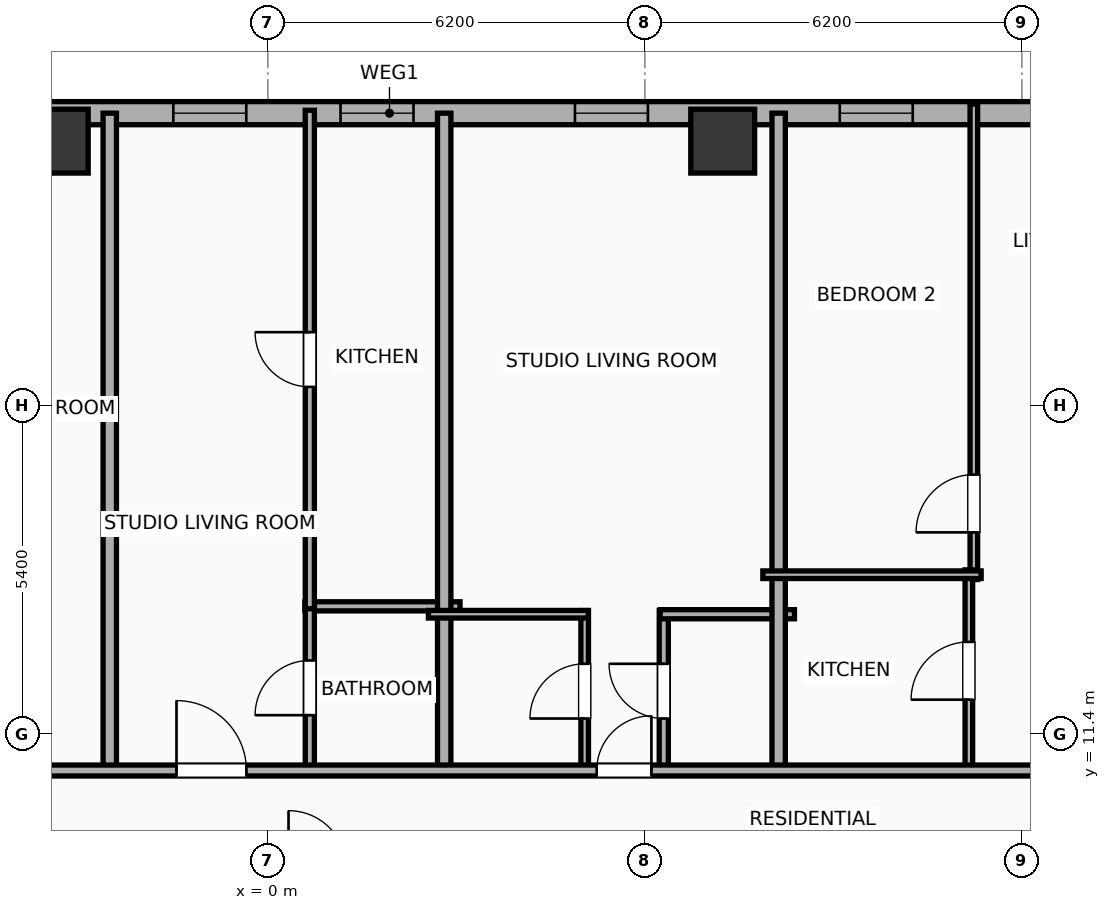
"""IFC4 building model, lengths in metres.
Left out: names, types, materials, properties, quantities, classifications, styles, units other than length and angle.
Written with IfcOpenShell. Run it as: python <this file> out.ifc"""

import sys

from ifc_helpers import new_model, si_unit, direction, frame, frame_2d, origin, origin_2d, place, context, subcontext, project, spatial, rectangle, hollow_rectangle, extrude, element, fill, save


model = new_model("IFC4")
c1 = context("Model", 3, precision=1e-05, world=origin(), true_north=direction((0.0, 1.0)))
c2 = subcontext(c1, "Body", "Model", "MODEL_VIEW")
j1 = project(units=[si_unit("LENGTHUNIT", "METRE"), si_unit("PLANEANGLEUNIT", "RADIAN")], contexts=[c1])
p1 = place(None, origin())
s1 = spatial("IfcSite", under=j1, at=p1, CompositionType="ELEMENT")
p2 = place(p1, origin())
s2 = spatial("IfcBuilding", under=s1, at=p2, CompositionType="ELEMENT")
p3 = place(p2, frame((0.0, 0.0, 132.6)))
s3 = spatial("IfcBuildingStorey", under=s2, at=p3, CompositionType="ELEMENT", Elevation=132.6)
for number, where, z_axis, x_axis in (
    (1, (7.48, 21.15, 0.0), (0.0, 0.0, 1.0), (1.0, 0.0, 0.0)),
    (2, (-3.48, 21.15, 0.0), (0.0, 0.0, 1.0), (1.0, 0.0, 0.0)),
):
    element("IfcColumn", number, at=place(p3, frame(where, z_axis=z_axis, x_axis=x_axis)), inside=s3, PredefinedType="COLUMN", context=c2, shape_type="SweptSolid", body=[
        extrude(hollow_rectangle(XDim=1.05, YDim=1.05, WallThickness=0.036, at=origin_2d()), origin(), (0.0, 0.0, 1.0), 3.9),
    ])
p4 = place(p3, frame((-25.381, 21.61, 0.0), z_axis=(0.0, 0.0, 1.0), x_axis=(1.0, 0.0, 0.0)))
e3 = element("IfcWall", 3, at=p4, inside=s3, PredefinedType="ELEMENTEDWALL", context=c2, shape_type="SweptSolid", body=[
    extrude(rectangle(XDim=54.763, YDim=0.38, at=frame_2d((27.381, 0.0))), origin(), (0.0, 0.0, 1.0), 3.65),
])
p5 = place(p4, frame((5.645, 0.0, 0.75)))
e4 = element("IfcOpeningElement", 4, at=p5, cuts=e3, PredefinedType="OPENING", context=c2, shape_type="SweptSolid", body=[
    extrude(rectangle(XDim=2.4, YDim=2.1, at=frame_2d((1.2, 1.05))), frame((0.0, 0.2, 0.0), z_axis=(0.0, -1.0, 0.0), x_axis=(1.0, 0.0, 0.0)), (0.0, 0.0, 1.0), 0.4),
])
p6 = place(p4, frame((45.067, 0.0, 0.75)))
e5 = element("IfcOpeningElement", 5, at=p6, cuts=e3, PredefinedType="OPENING", context=c2, shape_type="SweptSolid", body=[
    extrude(rectangle(XDim=2.4, YDim=2.1, at=frame_2d((1.2, 1.05))), frame((0.0, 0.2, 0.0), z_axis=(0.0, -1.0, 0.0), x_axis=(1.0, 0.0, 0.0)), (0.0, 0.0, 1.0), 0.4),
])
p7 = place(p4, frame((1.831, 0.0, 0.75)))
e6 = element("IfcOpeningElement", 6, at=p7, cuts=e3, PredefinedType="OPENING", context=c2, shape_type="SweptSolid", body=[
    extrude(rectangle(XDim=1.2, YDim=2.05, at=frame_2d((0.6, 1.025))), frame((0.0, 0.2, 0.0), z_axis=(0.0, -1.0, 0.0), x_axis=(1.0, 0.0, 0.0)), (0.0, 0.0, 1.0), 0.4),
])
p8 = place(p4, frame((8.996, 0.0, 0.75)))
e7 = element("IfcOpeningElement", 7, at=p8, cuts=e3, PredefinedType="OPENING", context=c2, shape_type="SweptSolid", body=[
    extrude(rectangle(XDim=1.2, YDim=2.05, at=frame_2d((0.6, 1.025))), frame((0.0, 0.2, 0.0), z_axis=(0.0, -1.0, 0.0), x_axis=(1.0, 0.0, 0.0)), (0.0, 0.0, 1.0), 0.4),
])
p9 = place(p4, frame((15.102, 0.0, 0.75)))
e8 = element("IfcOpeningElement", 8, at=p9, cuts=e3, PredefinedType="OPENING", context=c2, shape_type="SweptSolid", body=[
    extrude(rectangle(XDim=1.2, YDim=2.05, at=frame_2d((0.6, 1.025))), frame((0.0, 0.2, 0.0), z_axis=(0.0, -1.0, 0.0), x_axis=(1.0, 0.0, 0.0)), (0.0, 0.0, 1.0), 0.4),
])
p10 = place(p4, frame((12.352, 0.0, 0.75)))
e9 = element("IfcOpeningElement", 9, at=p10, cuts=e3, PredefinedType="OPENING", context=c2, shape_type="SweptSolid", body=[
    extrude(rectangle(XDim=1.2, YDim=2.05, at=frame_2d((0.6, 1.025))), frame((0.0, 0.2, 0.0), z_axis=(0.0, -1.0, 0.0), x_axis=(1.0, 0.0, 0.0)), (0.0, 0.0, 1.0), 0.4),
])
p11 = place(p4, frame((19.936, 0.0, 0.75)))
e10 = element("IfcOpeningElement", 10, at=p11, cuts=e3, PredefinedType="OPENING", context=c2, shape_type="SweptSolid", body=[
    extrude(rectangle(XDim=1.2, YDim=2.05, at=frame_2d((0.6, 1.025))), frame((0.0, 0.2, 0.0), z_axis=(0.0, -1.0, 0.0), x_axis=(1.0, 0.0, 0.0)), (0.0, 0.0, 1.0), 0.4),
])
p12 = place(p4, frame((17.786, 0.0, 0.75)))
e11 = element("IfcOpeningElement", 11, at=p12, cuts=e3, PredefinedType="OPENING", context=c2, shape_type="SweptSolid", body=[
    extrude(rectangle(XDim=1.2, YDim=2.05, at=frame_2d((0.6, 1.025))), frame((0.0, 0.2, 0.0), z_axis=(0.0, -1.0, 0.0), x_axis=(1.0, 0.0, 0.0)), (0.0, 0.0, 1.0), 0.4),
])
p13 = place(p4, frame((23.826, 0.0, 0.75)))
e12 = element("IfcOpeningElement", 12, at=p13, cuts=e3, PredefinedType="OPENING", context=c2, shape_type="SweptSolid", body=[
    extrude(rectangle(XDim=1.2, YDim=2.05, at=frame_2d((0.6, 1.025))), frame((0.0, 0.2, 0.0), z_axis=(0.0, -1.0, 0.0), x_axis=(1.0, 0.0, 0.0)), (0.0, 0.0, 1.0), 0.4),
])
p14 = place(p4, frame((26.576, 0.0, 0.75)))
e13 = element("IfcOpeningElement", 13, at=p14, cuts=e3, PredefinedType="OPENING", context=c2, shape_type="SweptSolid", body=[
    extrude(rectangle(XDim=1.2, YDim=2.05, at=frame_2d((0.6, 1.025))), frame((0.0, 0.2, 0.0), z_axis=(0.0, -1.0, 0.0), x_axis=(1.0, 0.0, 0.0)), (0.0, 0.0, 1.0), 0.4),
])
p15 = place(p4, frame((30.431, 0.0, 0.75)))
e14 = element("IfcOpeningElement", 14, at=p15, cuts=e3, PredefinedType="OPENING", context=c2, shape_type="SweptSolid", body=[
    extrude(rectangle(XDim=1.2, YDim=2.05, at=frame_2d((0.6, 1.025))), frame((0.0, 0.2, 0.0), z_axis=(0.0, -1.0, 0.0), x_axis=(1.0, 0.0, 0.0)), (0.0, 0.0, 1.0), 0.4),
])
p16 = place(p4, frame((38.581, 0.0, 0.75)))
e15 = element("IfcOpeningElement", 15, at=p16, cuts=e3, PredefinedType="OPENING", context=c2, shape_type="SweptSolid", body=[
    extrude(rectangle(XDim=1.2, YDim=2.05, at=frame_2d((0.6, 1.025))), frame((0.0, 0.2, 0.0), z_axis=(0.0, -1.0, 0.0), x_axis=(1.0, 0.0, 0.0)), (0.0, 0.0, 1.0), 0.4),
])
p17 = place(p4, frame((34.786, 0.0, 0.75)))
e16 = element("IfcOpeningElement", 16, at=p17, cuts=e3, PredefinedType="OPENING", context=c2, shape_type="SweptSolid", body=[
    extrude(rectangle(XDim=1.2, YDim=2.05, at=frame_2d((0.6, 1.025))), frame((0.0, 0.2, 0.0), z_axis=(0.0, -1.0, 0.0), x_axis=(1.0, 0.0, 0.0)), (0.0, 0.0, 1.0), 0.4),
])
p18 = place(p4, frame((41.876, 0.0, 0.75)))
e17 = element("IfcOpeningElement", 17, at=p18, cuts=e3, PredefinedType="OPENING", context=c2, shape_type="SweptSolid", body=[
    extrude(rectangle(XDim=1.2, YDim=2.05, at=frame_2d((0.6, 1.025))), frame((0.0, 0.2, 0.0), z_axis=(0.0, -1.0, 0.0), x_axis=(1.0, 0.0, 0.0)), (0.0, 0.0, 1.0), 0.4),
])
p19 = place(p4, frame((49.385, 0.0, 0.75)))
e18 = element("IfcOpeningElement", 18, at=p19, cuts=e3, PredefinedType="OPENING", context=c2, shape_type="SweptSolid", body=[
    extrude(rectangle(XDim=1.2, YDim=2.05, at=frame_2d((0.6, 1.025))), frame((0.0, 0.2, 0.0), z_axis=(0.0, -1.0, 0.0), x_axis=(1.0, 0.0, 0.0)), (0.0, 0.0, 1.0), 0.4),
])
p20 = place(p4, frame((52.181, 0.0, 0.75)))
e19 = element("IfcOpeningElement", 19, at=p20, cuts=e3, PredefinedType="OPENING", context=c2, shape_type="SweptSolid", body=[
    extrude(rectangle(XDim=1.2, YDim=2.05, at=frame_2d((0.6, 1.025))), frame((0.0, 0.2, 0.0), z_axis=(0.0, -1.0, 0.0), x_axis=(1.0, 0.0, 0.0)), (0.0, 0.0, 1.0), 0.4),
])
p21 = place(p3, frame((-2.6, 10.72, 0.0), z_axis=(0.0, 0.0, 1.0), x_axis=(0.0, 1.0, 0.0)))
e20 = element("IfcWall", 20, at=p21, inside=s3, PredefinedType="PARTITIONING", context=c2, shape_type="SweptSolid", body=[
    extrude(rectangle(XDim=10.89, YDim=0.22, at=frame_2d((5.445, 0.0))), origin(), (0.0, 0.0, 1.0), 3.65),
])
p22 = place(p3, frame((0.61, 13.5, 0.0), z_axis=(0.0, 0.0, 1.0), x_axis=(1.0, 0.0, 0.0)))
e21 = element("IfcWall", 21, at=p22, inside=s3, PredefinedType="PLUMBINGWALL", context=c2, shape_type="SweptSolid", body=[
    extrude(rectangle(XDim=2.55, YDim=0.15, at=frame_2d((1.275, 0.0))), origin(), (0.0, 0.0, 1.0), 3.65),
])
p23 = place(p3, frame((0.69, 10.78, 0.0), z_axis=(0.0, 0.0, 1.0), x_axis=(0.0, 1.0, 0.0)))
e22 = element("IfcWall", 22, at=p23, inside=s3, PredefinedType="PLUMBINGWALL", context=c2, shape_type="SweptSolid", body=[
    extrude(rectangle(XDim=2.76, YDim=0.15, at=frame_2d((1.38, 0.0))), origin(), (0.0, 0.0, 1.0), 3.65),
])
p24 = place(p23, frame((0.93, 0.0, 0.0)))
e23 = element("IfcOpeningElement", 23, at=p24, cuts=e22, PredefinedType="OPENING", context=c2, shape_type="SweptSolid", body=[
    extrude(rectangle(XDim=0.9, YDim=2.05, at=frame_2d((0.45, 1.025))), frame((0.0, 0.085, 0.0), z_axis=(0.0, -1.0, 0.0), x_axis=(1.0, 0.0, 0.0)), (0.0, 0.0, 1.0), 0.17),
])
p25 = place(p3, frame((0.69, 13.46, 0.0), z_axis=(0.0, 0.0, 1.0), x_axis=(0.0, 1.0, 0.0)))
e24 = element("IfcWall", 24, at=p25, inside=s3, PredefinedType="PLUMBINGWALL", context=c2, shape_type="SweptSolid", body=[
    extrude(rectangle(XDim=8.198, YDim=0.15, at=frame_2d((4.099, 0.0))), origin(), (0.0, 0.0, 1.0), 3.65),
])
p26 = place(p25, frame((3.649, 0.0, 0.0)))
e25 = element("IfcOpeningElement", 25, at=p26, cuts=e24, PredefinedType="OPENING", context=c2, shape_type="SweptSolid", body=[
    extrude(rectangle(XDim=0.9, YDim=2.05, at=frame_2d((0.45, 1.025))), frame((0.0, 0.085, 0.0), z_axis=(0.0, -1.0, 0.0), x_axis=(1.0, 0.0, 0.0)), (0.0, 0.0, 1.0), 0.17),
])
p27 = place(p3, frame((2.9, 10.72, 0.0), z_axis=(0.0, 0.0, 1.0), x_axis=(0.0, 1.0, 0.0)))
e26 = element("IfcWall", 26, at=p27, inside=s3, PredefinedType="PARTITIONING", context=c2, shape_type="SweptSolid", body=[
    extrude(rectangle(XDim=10.89, YDim=0.22, at=frame_2d((5.445, 0.0))), origin(), (0.0, 0.0, 1.0), 3.65),
])
p28 = place(p3, frame((5.21, 10.78, 0.0), z_axis=(0.0, 0.0, 1.0), x_axis=(0.0, 1.0, 0.0)))
e27 = element("IfcWall", 27, at=p28, inside=s3, PredefinedType="PARTITIONING", context=c2, shape_type="SweptSolid", body=[
    extrude(rectangle(XDim=2.65, YDim=0.125, at=frame_2d((1.325, 0.0))), origin(), (0.0, 0.0, 1.0), 3.04),
])
p29 = place(p28, frame((0.875, 0.0, 0.0)))
e28 = element("IfcOpeningElement", 28, at=p29, cuts=e27, PredefinedType="OPENING", context=c2, shape_type="SweptSolid", body=[
    extrude(rectangle(XDim=0.9, YDim=2.05, at=frame_2d((0.45, 1.025))), frame((0.0, 0.073, 0.0), z_axis=(0.0, -1.0, 0.0), x_axis=(1.0, 0.0, 0.0)), (0.0, 0.0, 1.0), 0.145),
])
p30 = place(p3, frame((6.511, 10.78, 0.0), z_axis=(0.0, 0.0, 1.0), x_axis=(0.0, 1.0, 0.0)))
e29 = element("IfcWall", 29, at=p30, inside=s3, PredefinedType="PLUMBINGWALL", context=c2, shape_type="SweptSolid", body=[
    extrude(rectangle(XDim=2.65, YDim=0.15, at=frame_2d((1.325, 0.0))), origin(), (0.0, 0.0, 1.0), 3.65),
])
p31 = place(p30, frame((0.875, 0.0, 0.0)))
e30 = element("IfcOpeningElement", 30, at=p31, cuts=e29, PredefinedType="OPENING", context=c2, shape_type="SweptSolid", body=[
    extrude(rectangle(XDim=0.9, YDim=2.05, at=frame_2d((0.45, 1.025))), frame((0.0, 0.085, 0.0), z_axis=(0.0, -1.0, 0.0), x_axis=(1.0, 0.0, 0.0)), (0.0, 0.0, 1.0), 0.17),
])
p32 = place(p3, frame((2.64, 13.37, 0.0), z_axis=(0.0, 0.0, 1.0), x_axis=(1.0, 0.0, 0.0)))
e31 = element("IfcWall", 31, at=p32, inside=s3, PredefinedType="PARTITIONING", context=c2, shape_type="SweptSolid", body=[
    extrude(rectangle(XDim=2.63, YDim=0.125, at=frame_2d((1.315, 0.0))), origin(), (0.0, 0.0, 1.0), 3.65),
])
p33 = place(p3, frame((6.451, 13.37, 0.0), z_axis=(0.0, 0.0, 1.0), x_axis=(1.0, 0.0, 0.0)))
e32 = element("IfcWall", 32, at=p33, inside=s3, PredefinedType="PLUMBINGWALL", context=c2, shape_type="SweptSolid", body=[
    extrude(rectangle(XDim=2.209, YDim=0.15, at=frame_2d((1.104, 0.0))), origin(), (0.0, 0.0, 1.0), 3.65),
])
p34 = place(p3, frame((8.4, 10.72, 0.0), z_axis=(0.0, 0.0, 1.0), x_axis=(0.0, 1.0, 0.0)))
e33 = element("IfcWall", 33, at=p34, inside=s3, PredefinedType="PARTITIONING", context=c2, shape_type="SweptSolid", body=[
    extrude(rectangle(XDim=10.89, YDim=0.22, at=frame_2d((5.445, 0.0))), origin(), (0.0, 0.0, 1.0), 3.65),
])
p35 = place(p3, frame((11.61, 13.94, 0.0), z_axis=(0.0, 0.0, 1.0), x_axis=(0.0, 1.0, 0.0)))
e34 = element("IfcWall", 34, at=p35, inside=s3, PredefinedType="PARTITIONING", context=c2, shape_type="SweptSolid", body=[
    extrude(rectangle(XDim=7.82, YDim=0.125, at=frame_2d((3.91, 0.0))), origin(), (0.0, 0.0, 1.0), 3.65),
])
p36 = place(p35, frame((0.776, 0.0, 0.0)))
e35 = element("IfcOpeningElement", 35, at=p36, cuts=e34, PredefinedType="OPENING", context=c2, shape_type="SweptSolid", body=[
    extrude(rectangle(XDim=0.95, YDim=2.05, at=frame_2d((0.475, 1.025))), frame((0.0, 0.073, 0.0), z_axis=(0.0, -1.0, 0.0), x_axis=(1.0, 0.0, 0.0)), (0.0, 0.0, 1.0), 0.145),
])
p37 = place(p3, frame((11.528, 10.78, 0.0), z_axis=(0.0, 0.0, 1.0), x_axis=(0.0, 1.0, 0.0)))
e36 = element("IfcWall", 36, at=p37, inside=s3, PredefinedType="PARTITIONING", context=c2, shape_type="SweptSolid", body=[
    extrude(rectangle(XDim=3.32, YDim=0.125, at=frame_2d((1.66, 0.0))), origin(), (0.0, 0.0, 1.0), 3.65),
])
p38 = place(p37, frame((1.185, 0.0, 0.0)))
e37 = element("IfcOpeningElement", 37, at=p38, cuts=e36, PredefinedType="OPENING", context=c2, shape_type="SweptSolid", body=[
    extrude(rectangle(XDim=0.95, YDim=2.05, at=frame_2d((0.475, 1.025))), frame((0.0, 0.073, 0.0), z_axis=(0.0, -1.0, 0.0), x_axis=(1.0, 0.0, 0.0)), (0.0, 0.0, 1.0), 0.145),
])
p39 = place(p3, frame((8.14, 14.02, 0.0), z_axis=(0.0, 0.0, 1.0), x_axis=(1.0, 0.0, 0.0)))
e38 = element("IfcWall", 38, at=p39, inside=s3, PredefinedType="PARTITIONING", context=c2, shape_type="SweptSolid", body=[
    extrude(rectangle(XDim=3.59, YDim=0.125, at=frame_2d((1.795, 0.0))), origin(), (0.0, 0.0, 1.0), 3.65),
])
p40 = place(p3, frame((-29.21, 10.8, 0.0), z_axis=(0.0, 0.0, 1.0), x_axis=(1.0, 0.0, 0.0)))
e39 = element("IfcWall", 39, at=p40, inside=s3, PredefinedType="PARTITIONING", context=c2, shape_type="SweptSolid", body=[
    extrude(rectangle(XDim=62.42, YDim=0.18, at=frame_2d((31.21, 0.0))), origin(), (0.0, 0.0, 1.0), 3.65),
])
p41 = place(p40, frame((3.457, 0.0, 0.0)))
e40 = element("IfcOpeningElement", 40, at=p41, cuts=e39, PredefinedType="OPENING", context=c2, shape_type="SweptSolid", body=[
    extrude(rectangle(XDim=1.15, YDim=2.05, at=frame_2d((0.575, 1.025))), frame((0.0, 0.1, 0.0), z_axis=(0.0, -1.0, 0.0), x_axis=(1.0, 0.0, 0.0)), (0.0, 0.0, 1.0), 0.2),
])
p42 = place(p40, frame((11.297, 0.0, 0.0)))
e41 = element("IfcOpeningElement", 41, at=p42, cuts=e39, PredefinedType="OPENING", context=c2, shape_type="SweptSolid", body=[
    extrude(rectangle(XDim=1.15, YDim=2.05, at=frame_2d((0.575, 1.025))), frame((0.0, 0.1, 0.0), z_axis=(0.0, -1.0, 0.0), x_axis=(1.0, 0.0, 0.0)), (0.0, 0.0, 1.0), 0.2),
])
p43 = place(p40, frame((18.925, 0.0, 0.0)))
e42 = element("IfcOpeningElement", 42, at=p43, cuts=e39, PredefinedType="OPENING", context=c2, shape_type="SweptSolid", body=[
    extrude(rectangle(XDim=1.15, YDim=2.05, at=frame_2d((0.575, 1.025))), frame((0.0, 0.1, 0.0), z_axis=(0.0, -1.0, 0.0), x_axis=(1.0, 0.0, 0.0)), (0.0, 0.0, 1.0), 0.2),
])
p44 = place(p40, frame((24.362, 0.0, 0.0)))
e43 = element("IfcOpeningElement", 43, at=p44, cuts=e39, PredefinedType="OPENING", context=c2, shape_type="SweptSolid", body=[
    extrude(rectangle(XDim=1.15, YDim=2.05, at=frame_2d((0.575, 1.025))), frame((0.0, 0.1, 0.0), z_axis=(0.0, -1.0, 0.0), x_axis=(1.0, 0.0, 0.0)), (0.0, 0.0, 1.0), 0.2),
])
p45 = place(p40, frame((27.708, 0.0, 0.0)))
e44 = element("IfcOpeningElement", 44, at=p45, cuts=e39, PredefinedType="OPENING", context=c2, shape_type="SweptSolid", body=[
    extrude(rectangle(XDim=1.15, YDim=2.05, at=frame_2d((0.575, 1.025))), frame((0.0, 0.1, 0.0), z_axis=(0.0, -1.0, 0.0), x_axis=(1.0, 0.0, 0.0)), (0.0, 0.0, 1.0), 0.2),
])
p46 = place(p40, frame((34.618, 0.0, 0.0)))
e45 = element("IfcOpeningElement", 45, at=p46, cuts=e39, PredefinedType="OPENING", context=c2, shape_type="SweptSolid", body=[
    extrude(rectangle(XDim=0.9, YDim=2.05, at=frame_2d((0.45, 1.025))), frame((0.0, 0.1, 0.0), z_axis=(0.0, -1.0, 0.0), x_axis=(1.0, 0.0, 0.0)), (0.0, 0.0, 1.0), 0.2),
])
p47 = place(p40, frame((43.106, 0.0, 0.0)))
e46 = element("IfcOpeningElement", 46, at=p47, cuts=e39, PredefinedType="OPENING", context=c2, shape_type="SweptSolid", body=[
    extrude(rectangle(XDim=1.15, YDim=2.05, at=frame_2d((0.575, 1.025))), frame((0.0, 0.1, 0.0), z_axis=(0.0, -1.0, 0.0), x_axis=(1.0, 0.0, 0.0)), (0.0, 0.0, 1.0), 0.2),
])
p48 = place(p40, frame((51.777, 0.0, 0.0)))
e47 = element("IfcOpeningElement", 47, at=p48, cuts=e39, PredefinedType="OPENING", context=c2, shape_type="SweptSolid", body=[
    extrude(rectangle(XDim=0.9, YDim=2.05, at=frame_2d((0.45, 1.025))), frame((0.0, 0.1, 0.0), z_axis=(0.0, -1.0, 0.0), x_axis=(1.0, 0.0, 0.0)), (0.0, 0.0, 1.0), 0.2),
])
p49 = place(p40, frame((58.718, 0.0, 0.0)))
e48 = element("IfcOpeningElement", 48, at=p49, cuts=e39, PredefinedType="OPENING", context=c2, shape_type="SweptSolid", body=[
    extrude(rectangle(XDim=0.9, YDim=2.05, at=frame_2d((0.45, 1.025))), frame((0.0, 0.1, 0.0), z_axis=(0.0, -1.0, 0.0), x_axis=(1.0, 0.0, 0.0)), (0.0, 0.0, 1.0), 0.2),
])
p50 = place(p13, origin())
e49 = element("IfcWindow", 49, at=p50, inside=s3, PartitioningType="SINGLE_PANEL", PredefinedType="WINDOW", context=c2, shape_type="SweptSolid", body=[
    extrude(rectangle(XDim=1.2, YDim=2.05, at=frame_2d((0.6, 1.025))), frame((0.0, 0.03, 0.0), z_axis=(0.0, -1.0, 0.0), x_axis=(1.0, 0.0, 0.0)), (0.0, 0.0, 1.0), 0.06),
])
fill(e12, e49)
p51 = place(p14, origin())
e50 = element("IfcWindow", 50, at=p51, inside=s3, PartitioningType="SINGLE_PANEL", PredefinedType="WINDOW", context=c2, shape_type="SweptSolid", body=[
    extrude(rectangle(XDim=1.2, YDim=2.05, at=frame_2d((0.6, 1.025))), frame((0.0, 0.03, 0.0), z_axis=(0.0, -1.0, 0.0), x_axis=(1.0, 0.0, 0.0)), (0.0, 0.0, 1.0), 0.06),
])
fill(e13, e50)
p52 = place(p15, origin())
e51 = element("IfcWindow", 51, at=p52, inside=s3, PartitioningType="SINGLE_PANEL", PredefinedType="WINDOW", context=c2, shape_type="SweptSolid", body=[
    extrude(rectangle(XDim=1.2, YDim=2.05, at=frame_2d((0.6, 1.025))), frame((0.0, 0.03, 0.0), z_axis=(0.0, -1.0, 0.0), x_axis=(1.0, 0.0, 0.0)), (0.0, 0.0, 1.0), 0.06),
])
fill(e14, e51)
p53 = place(p17, origin())
e52 = element("IfcWindow", 52, at=p53, inside=s3, PartitioningType="SINGLE_PANEL", PredefinedType="WINDOW", context=c2, shape_type="SweptSolid", body=[
    extrude(rectangle(XDim=1.2, YDim=2.05, at=frame_2d((0.6, 1.025))), frame((0.0, 0.03, 0.0), z_axis=(0.0, -1.0, 0.0), x_axis=(1.0, 0.0, 0.0)), (0.0, 0.0, 1.0), 0.06),
])
fill(e16, e52)
p54 = place(p24, origin())
e53 = element("IfcDoor", 53, at=p54, inside=s3, OperationType="SINGLE_SWING_LEFT", PredefinedType="DOOR", context=c2, shape_type="SweptSolid", body=[
    extrude(rectangle(XDim=0.9, YDim=2.05, at=frame_2d((0.45, 1.025))), frame((0.0, 0.025, 0.0), z_axis=(0.0, -1.0, 0.0), x_axis=(1.0, 0.0, 0.0)), (0.0, 0.0, 1.0), 0.05),
])
fill(e23, e53)
p55 = place(p26, origin())
e54 = element("IfcDoor", 54, at=p55, inside=s3, OperationType="SINGLE_SWING_RIGHT", PredefinedType="DOOR", context=c2, shape_type="SweptSolid", body=[
    extrude(rectangle(XDim=0.9, YDim=2.05, at=frame_2d((0.45, 1.025))), frame((0.0, 0.025, 0.0), z_axis=(0.0, -1.0, 0.0), x_axis=(1.0, 0.0, 0.0)), (0.0, 0.0, 1.0), 0.05),
])
fill(e25, e54)
p56 = place(p29, origin())
e55 = element("IfcDoor", 55, at=p56, inside=s3, OperationType="SINGLE_SWING_LEFT", PredefinedType="DOOR", context=c2, shape_type="SweptSolid", body=[
    extrude(rectangle(XDim=0.9, YDim=2.05, at=frame_2d((0.45, 1.025))), frame((0.0, 0.025, 0.0), z_axis=(0.0, -1.0, 0.0), x_axis=(1.0, 0.0, 0.0)), (0.0, 0.0, 1.0), 0.05),
])
fill(e28, e55)
p57 = place(p31, origin())
e56 = element("IfcDoor", 56, at=p57, inside=s3, OperationType="SINGLE_SWING_RIGHT", PredefinedType="DOOR", context=c2, shape_type="SweptSolid", body=[
    extrude(rectangle(XDim=0.9, YDim=2.05, at=frame_2d((0.45, 1.025))), frame((0.0, 0.025, 0.0), z_axis=(0.0, -1.0, 0.0), x_axis=(1.0, 0.0, 0.0)), (0.0, 0.0, 1.0), 0.05),
])
fill(e30, e56)
p58 = place(p36, origin())
e57 = element("IfcDoor", 57, at=p58, inside=s3, OperationType="SINGLE_SWING_LEFT", PredefinedType="DOOR", context=c2, shape_type="SweptSolid", body=[
    extrude(rectangle(XDim=0.95, YDim=2.05, at=frame_2d((0.475, 1.025))), frame((0.0, 0.025, 0.0), z_axis=(0.0, -1.0, 0.0), x_axis=(1.0, 0.0, 0.0)), (0.0, 0.0, 1.0), 0.05),
])
fill(e35, e57)
p59 = place(p38, origin())
e58 = element("IfcDoor", 58, at=p59, inside=s3, OperationType="SINGLE_SWING_LEFT", PredefinedType="DOOR", context=c2, shape_type="SweptSolid", body=[
    extrude(rectangle(XDim=0.95, YDim=2.05, at=frame_2d((0.475, 1.025))), frame((0.0, 0.025, 0.0), z_axis=(0.0, -1.0, 0.0), x_axis=(1.0, 0.0, 0.0)), (0.0, 0.0, 1.0), 0.05),
])
fill(e37, e58)
p60 = place(p45, origin())
e59 = element("IfcDoor", 59, at=p60, inside=s3, OperationType="SINGLE_SWING_LEFT", PredefinedType="DOOR", context=c2, shape_type="SweptSolid", body=[
    extrude(rectangle(XDim=1.15, YDim=2.05, at=frame_2d((0.575, 1.025))), frame((0.0, 0.025, 0.0), z_axis=(0.0, -1.0, 0.0), x_axis=(1.0, 0.0, 0.0)), (0.0, 0.0, 1.0), 0.05),
])
fill(e44, e59)
p61 = place(p46, origin())
e60 = element("IfcDoor", 60, at=p61, inside=s3, OperationType="SINGLE_SWING_RIGHT", PredefinedType="DOOR", context=c2, shape_type="SweptSolid", body=[
    extrude(rectangle(XDim=0.9, YDim=2.05, at=frame_2d((0.45, 1.025))), frame((0.0, 0.025, 0.0), z_axis=(0.0, -1.0, 0.0), x_axis=(1.0, 0.0, 0.0)), (0.0, 0.0, 1.0), 0.05),
])
fill(e45, e60)
save(model, sys.argv[1])
